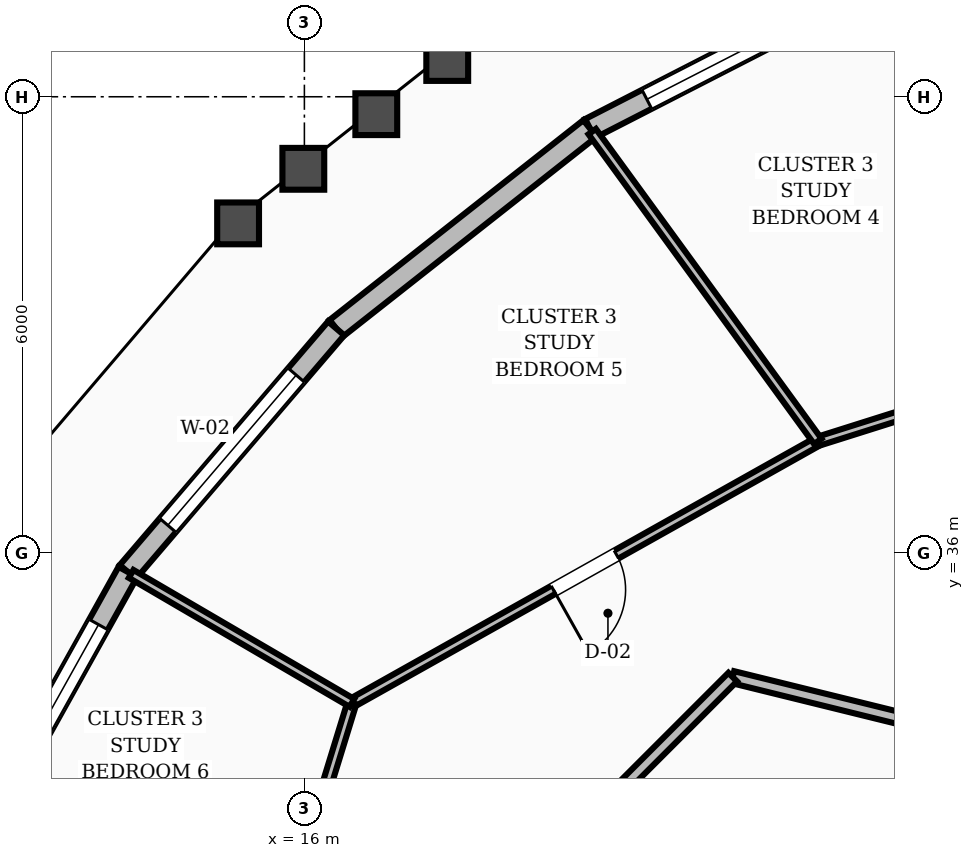
"""IFC4 building model, lengths in metres.
Left out: names, types, materials, properties, quantities, classifications, styles, units other than length and angle.
Written with IfcOpenShell. Run it as: python <this file> out.ifc"""

import sys

from ifc_helpers import new_model, si_unit, direction, frame, frame_2d, origin, place, context, subcontext, project, spatial, rectangle, extrude, element, fill, save


model = new_model("IFC4")
c1 = context("Model", 3, precision=1e-05, world=origin(), true_north=direction((0.0, 1.0)))
c2 = subcontext(c1, "Body", "Model", "MODEL_VIEW")
j1 = project(units=[si_unit("LENGTHUNIT", "METRE"), si_unit("PLANEANGLEUNIT", "RADIAN")], contexts=[c1])
p1 = place(None, origin())
s1 = spatial("IfcSite", under=j1, at=p1, CompositionType="ELEMENT")
p2 = place(p1, origin())
s2 = spatial("IfcBuilding", under=s1, at=p2, CompositionType="ELEMENT")
p3 = place(p2, frame((0.0, 0.0, 236.4)))
s3 = spatial("IfcBuildingStorey", under=s2, at=p3, CompositionType="ELEMENT", Elevation=236.4)
p4 = place(p3, frame((23.567, 43.536, 0.0), z_axis=(0.0, 0.0, 1.0), x_axis=(-0.889784216581, -0.456381471933, 0.0)))
e1 = element("IfcWall", 1, at=p4, inside=s3, PredefinedType="STANDARD", context=c2, shape_type="SweptSolid", body=[
    extrude(rectangle(XDim=4.282, YDim=0.28, at=frame_2d((2.141, 0.0))), origin(), (0.0, 0.0, 1.0), 2.88),
])
p5 = place(p4, frame((0.841, 0.0, 0.8)))
e2 = element("IfcOpeningElement", 2, at=p5, cuts=e1, PredefinedType="OPENING", context=c2, shape_type="SweptSolid", body=[
    extrude(rectangle(XDim=2.6, YDim=1.65, at=frame_2d((1.3, 0.825))), frame((0.0, 0.15, 0.0), z_axis=(0.0, -1.0, 0.0), x_axis=(1.0, 0.0, 0.0)), (0.0, 0.0, 1.0), 0.3),
])
p6 = place(p3, frame((19.757, 41.582, 0.0), z_axis=(0.0, 0.0, 1.0), x_axis=(-0.78564818009, -0.618673530322, 0.0)))
e3 = element("IfcWall", 3, at=p6, inside=s3, PredefinedType="STANDARD", context=c2, shape_type="SweptSolid", body=[
    extrude(rectangle(XDim=4.25, YDim=0.28, at=frame_2d((2.125, 0.0))), origin(), (0.0, 0.0, 1.0), 2.88),
])
p7 = place(p3, frame((16.418, 38.953, 0.0), z_axis=(0.0, 0.0, 1.0), x_axis=(-0.64992790189, -0.759995869952, 0.0)))
e4 = element("IfcWall", 4, at=p7, inside=s3, PredefinedType="STANDARD", context=c2, shape_type="SweptSolid", body=[
    extrude(rectangle(XDim=4.217, YDim=0.28, at=frame_2d((2.108, 0.0))), origin(), (0.0, 0.0, 1.0), 2.88),
])
p8 = place(p7, frame((0.808, 0.0, 0.8)))
e5 = element("IfcOpeningElement", 5, at=p8, cuts=e4, PredefinedType="OPENING", context=c2, shape_type="SweptSolid", body=[
    extrude(rectangle(XDim=2.6, YDim=1.65, at=frame_2d((1.3, 0.825))), frame((0.0, 0.15, 0.0), z_axis=(0.0, -1.0, 0.0), x_axis=(1.0, 0.0, 0.0)), (0.0, 0.0, 1.0), 0.3),
])
p9 = place(p3, frame((13.677, 35.748, 0.0), z_axis=(0.0, 0.0, 1.0), x_axis=(-0.486628377496, -0.873609078602, 0.0)))
e6 = element("IfcWall", 6, at=p9, inside=s3, PredefinedType="STANDARD", context=c2, shape_type="SweptSolid", body=[
    extrude(rectangle(XDim=4.185, YDim=0.28, at=frame_2d((2.092, 0.0))), origin(), (0.0, 0.0, 1.0), 2.88),
])
p10 = place(p9, frame((0.792, 0.0, 0.8)))
e7 = element("IfcOpeningElement", 7, at=p10, cuts=e6, PredefinedType="OPENING", context=c2, shape_type="SweptSolid", body=[
    extrude(rectangle(XDim=2.6, YDim=1.65, at=frame_2d((1.3, 0.825))), frame((0.0, 0.15, 0.0), z_axis=(0.0, -1.0, 0.0), x_axis=(1.0, 0.0, 0.0)), (0.0, 0.0, 1.0), 0.3),
])
p11 = place(p3, frame((25.752, 33.35, 0.0), z_axis=(0.0, 0.0, 1.0), x_axis=(-0.970939799552, 0.239323850978, 0.0)))
e8 = element("IfcWall", 8, at=p11, inside=s3, PredefinedType="SOLIDWALL", context=c2, shape_type="SweptSolid", body=[
    extrude(rectangle(XDim=4.241, YDim=0.16, at=frame_2d((2.12, 0.0))), origin(), (0.0, 0.0, 1.0), 2.87),
])
p12 = place(p3, frame((21.635, 34.365, 0.0), z_axis=(0.0, 0.0, 1.0), x_axis=(-0.707106781187, -0.707106781187, 0.0)))
e9 = element("IfcWall", 9, at=p12, inside=s3, PredefinedType="SOLIDWALL", context=c2, shape_type="SweptSolid", body=[
    extrude(rectangle(XDim=2.916, YDim=0.16, at=frame_2d((1.458, 0.0))), origin(), (0.0, 0.0, 1.0), 2.87),
])
p13 = place(p3, frame((25.847, 38.443, 0.0), z_axis=(0.0, 0.0, 1.0), x_axis=(-0.953534866418, -0.301282688726, 0.0)))
e10 = element("IfcWall", 10, at=p13, inside=s3, PredefinedType="PARTITIONING", context=c2, shape_type="SweptSolid", body=[
    extrude(rectangle(XDim=3.243, YDim=0.12, at=frame_2d((1.622, 0.0))), origin(), (0.0, 0.0, 1.0), 2.87),
])
p14 = place(p13, frame((1.146, 0.0, 0.0)))
e11 = element("IfcOpeningElement", 11, at=p14, cuts=e10, PredefinedType="OPENING", context=c2, shape_type="SweptSolid", body=[
    extrude(rectangle(XDim=0.95, YDim=2.1, at=frame_2d((0.475, 1.05))), frame((0.0, 0.07, 0.0), z_axis=(0.0, -1.0, 0.0), x_axis=(1.0, 0.0, 0.0)), (0.0, 0.0, 1.0), 0.14),
])
p15 = place(p3, frame((25.847, 38.443, 0.0), z_axis=(0.0, 0.0, 1.0), x_axis=(-0.408610947291, 0.912708657653, 0.0)))
e12 = element("IfcWall", 12, at=p15, inside=s3, PredefinedType="PARTITIONING", context=c2, shape_type="SweptSolid", body=[
    extrude(rectangle(XDim=5.53, YDim=0.12, at=frame_2d((2.765, 0.0))), origin(), (0.0, 0.0, 1.0), 2.87),
])
p16 = place(p3, frame((22.755, 37.466, 0.0), z_axis=(0.0, 0.0, 1.0), x_axis=(-0.872022279864, -0.489466182102, 0.0)))
e13 = element("IfcWall", 13, at=p16, inside=s3, PredefinedType="PARTITIONING", context=c2, shape_type="SweptSolid", body=[
    extrude(rectangle(XDim=7.029, YDim=0.12, at=frame_2d((3.515, 0.0))), origin(), (0.0, 0.0, 1.0), 2.87),
])
p17 = place(p16, frame((3.04, 0.0, 0.0)))
e14 = element("IfcOpeningElement", 14, at=p17, cuts=e13, PredefinedType="OPENING", context=c2, shape_type="SweptSolid", body=[
    extrude(rectangle(XDim=0.95, YDim=2.1, at=frame_2d((0.475, 1.05))), frame((0.0, 0.07, 0.0), z_axis=(0.0, -1.0, 0.0), x_axis=(1.0, 0.0, 0.0)), (0.0, 0.0, 1.0), 0.14),
])
p18 = place(p3, frame((22.755, 37.466, 0.0), z_axis=(0.0, 0.0, 1.0), x_axis=(-0.588684040903, 0.808363222806, 0.0)))
e15 = element("IfcWall", 15, at=p18, inside=s3, PredefinedType="PARTITIONING", context=c2, shape_type="SweptSolid", body=[
    extrude(rectangle(XDim=5.042, YDim=0.12, at=frame_2d((2.521, 0.0))), origin(), (0.0, 0.0, 1.0), 2.87),
])
p19 = place(p3, frame((16.625, 34.026, 0.0), z_axis=(0.0, 0.0, 1.0), x_axis=(-0.294182446775, -0.955749280936, 0.0)))
e16 = element("IfcWall", 16, at=p19, inside=s3, PredefinedType="PARTITIONING", context=c2, shape_type="SweptSolid", body=[
    extrude(rectangle(XDim=3.552, YDim=0.12, at=frame_2d((1.776, 0.0))), origin(), (0.0, 0.0, 1.0), 2.87),
])
p20 = place(p19, frame((1.301, 0.0, 0.0)))
e17 = element("IfcOpeningElement", 17, at=p20, cuts=e16, PredefinedType="OPENING", context=c2, shape_type="SweptSolid", body=[
    extrude(rectangle(XDim=0.95, YDim=2.1, at=frame_2d((0.475, 1.05))), frame((0.0, 0.07, 0.0), z_axis=(0.0, -1.0, 0.0), x_axis=(1.0, 0.0, 0.0)), (0.0, 0.0, 1.0), 0.14),
])
p21 = place(p3, frame((16.625, 34.026, 0.0), z_axis=(0.0, 0.0, 1.0), x_axis=(-0.863415459889, 0.504493551618, 0.0)))
e18 = element("IfcWall", 18, at=p21, inside=s3, PredefinedType="PARTITIONING", context=c2, shape_type="SweptSolid", body=[
    extrude(rectangle(XDim=3.364, YDim=0.12, at=frame_2d((1.682, 0.0))), origin(), (0.0, 0.0, 1.0), 2.87),
])
p22 = place(p5, origin())
e19 = element("IfcWindow", 19, at=p22, inside=s3, PartitioningType="SINGLE_PANEL", PredefinedType="WINDOW", context=c2, shape_type="SweptSolid", body=[
    extrude(rectangle(XDim=2.6, YDim=1.65, at=frame_2d((1.3, 0.825))), frame((0.0, 0.03, 0.0), z_axis=(0.0, -1.0, 0.0), x_axis=(1.0, 0.0, 0.0)), (0.0, 0.0, 1.0), 0.06),
])
fill(e2, e19)
p23 = place(p8, origin())
e20 = element("IfcWindow", 20, at=p23, inside=s3, PartitioningType="SINGLE_PANEL", PredefinedType="WINDOW", context=c2, shape_type="SweptSolid", body=[
    extrude(rectangle(XDim=2.6, YDim=1.65, at=frame_2d((1.3, 0.825))), frame((0.0, 0.03, 0.0), z_axis=(0.0, -1.0, 0.0), x_axis=(1.0, 0.0, 0.0)), (0.0, 0.0, 1.0), 0.06),
])
fill(e5, e20)
p24 = place(p10, origin())
e21 = element("IfcWindow", 21, at=p24, inside=s3, PartitioningType="SINGLE_PANEL", PredefinedType="WINDOW", context=c2, shape_type="SweptSolid", body=[
    extrude(rectangle(XDim=2.6, YDim=1.65, at=frame_2d((1.3, 0.825))), frame((0.0, 0.03, 0.0), z_axis=(0.0, -1.0, 0.0), x_axis=(1.0, 0.0, 0.0)), (0.0, 0.0, 1.0), 0.06),
])
fill(e7, e21)
p25 = place(p17, origin())
e22 = element("IfcDoor", 22, at=p25, inside=s3, OperationType="SINGLE_SWING_RIGHT", PredefinedType="DOOR", context=c2, shape_type="SweptSolid", body=[
    extrude(rectangle(XDim=0.95, YDim=2.1, at=frame_2d((0.475, 1.05))), frame((0.0, 0.025, 0.0), z_axis=(0.0, -1.0, 0.0), x_axis=(1.0, 0.0, 0.0)), (0.0, 0.0, 1.0), 0.05),
])
fill(e14, e22)
save(model, sys.argv[1])
